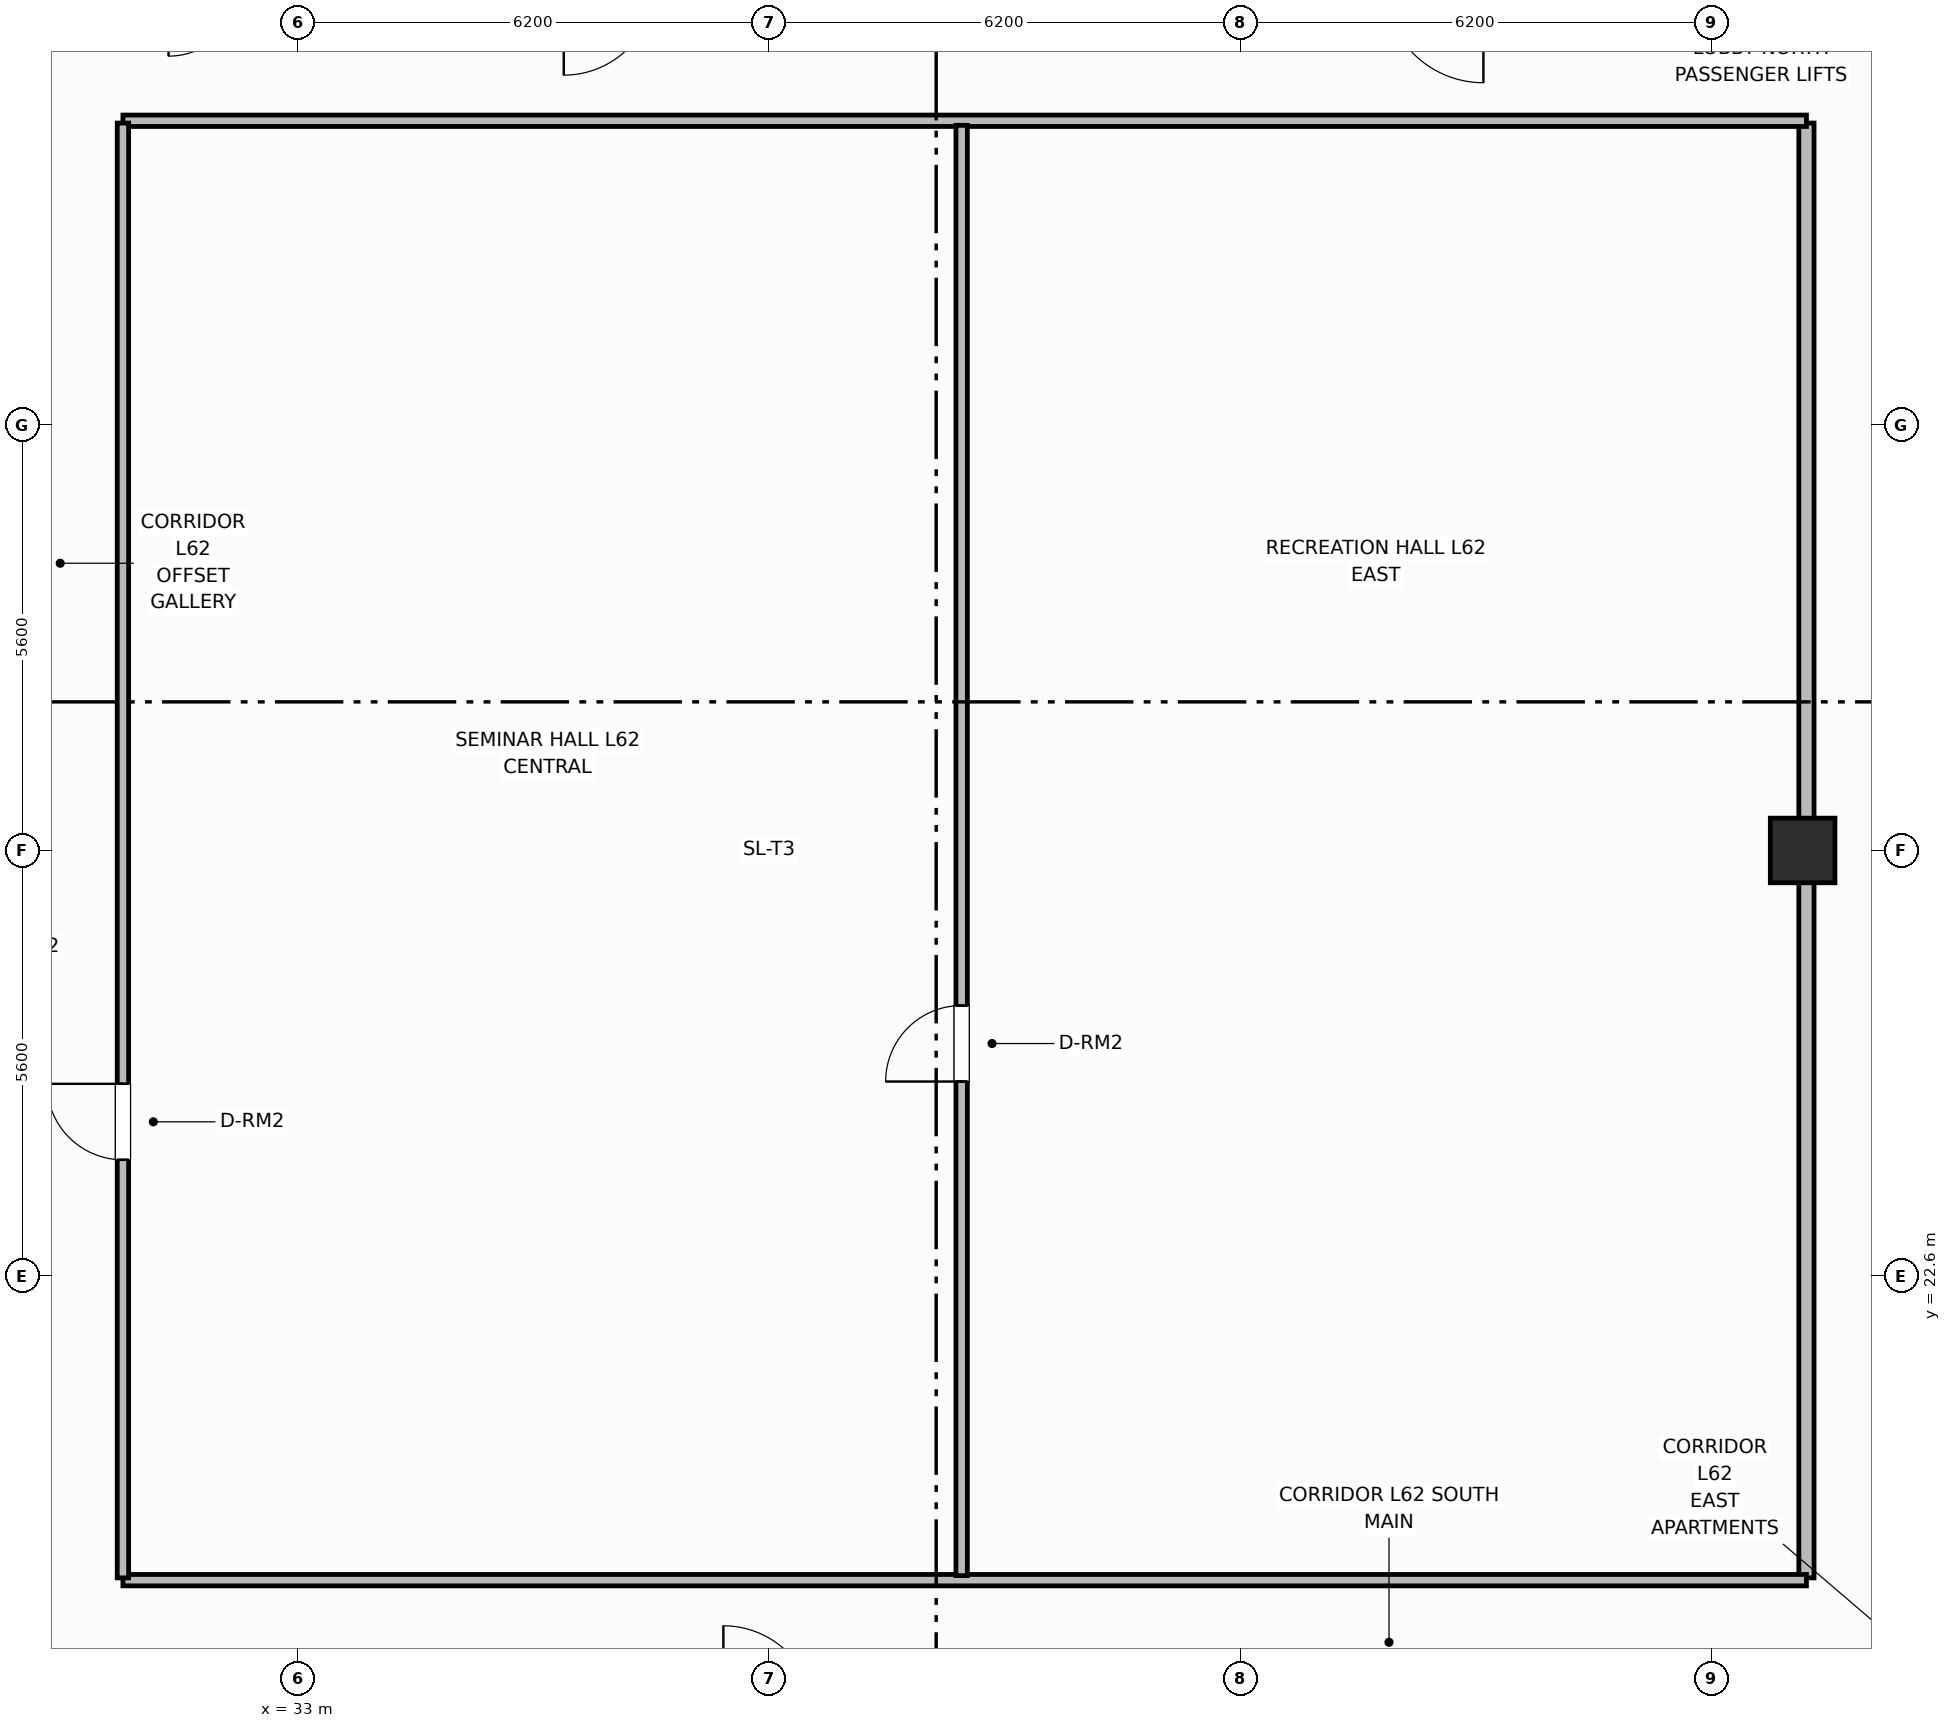
"""IFC4 building model, lengths in metres.
Left out: names, types, materials, properties, quantities, classifications, styles, units other than length and angle.
Written with IfcOpenShell. Run it as: python <this file> out.ifc"""

import sys

from ifc_helpers import new_model, si_unit, direction, frame, frame_2d, origin, origin_2d, place, context, subcontext, project, spatial, rectangle, extrude, element, fill, save


model = new_model("IFC4")
c1 = context("Model", 3, precision=1e-05, world=origin(), true_north=direction((0.0, 1.0)))
c2 = subcontext(c1, "Body", "Model", "MODEL_VIEW")
j1 = project(units=[si_unit("LENGTHUNIT", "METRE"), si_unit("PLANEANGLEUNIT", "RADIAN")], contexts=[c1])
p1 = place(None, origin())
s1 = spatial("IfcSite", under=j1, at=p1, CompositionType="ELEMENT")
p2 = place(p1, origin())
s2 = spatial("IfcBuilding", under=s1, at=p2, CompositionType="ELEMENT")
p3 = place(p2, frame((0.0, 0.0, 248.0)))
s3 = spatial("IfcBuildingStorey", under=s2, at=p3, CompositionType="ELEMENT", Elevation=248.0)
p4 = place(p3, frame((52.8, 28.2, 0.0), z_axis=(0.0, 0.0, 1.0), x_axis=(1.0, 0.0, 0.0)))
e1 = element("IfcColumn", 1, at=p4, inside=s3, PredefinedType="COLUMN", context=c2, shape_type="SweptSolid", body=[
    extrude(rectangle(XDim=0.85, YDim=0.85, at=origin_2d()), origin(), (0.0, 0.0, 1.0), 3.7),
])
p5 = place(p3, frame((52.85, 18.63, 0.0), z_axis=(0.0, 0.0, 1.0), x_axis=(0.0, 1.0, 0.0)))
e2 = element("IfcWall", 2, at=p5, inside=s3, PredefinedType="PARTITIONING", context=c2, shape_type="SweptSolid", body=[
    extrude(rectangle(XDim=19.14, YDim=0.2, at=frame_2d((9.57, 0.0))), origin(), (0.0, 0.0, 1.0), 2.56),
])
for number, where, z_axis, x_axis in (
    (3, (30.7, 18.6, 0.0), (0.0, 0.0, 1.0), (1.0, 0.0, 0.0)),
    (4, (30.7, 37.8, 0.0), (0.0, 0.0, 1.0), (1.0, 0.0, 0.0)),
):
    element("IfcWall", number, at=place(p3, frame(where, z_axis=z_axis, x_axis=x_axis)), inside=s3, PredefinedType="PARTITIONING", context=c2, shape_type="SweptSolid", body=[
        extrude(rectangle(XDim=22.15, YDim=0.15, at=frame_2d((11.075, 0.0))), origin(), (0.0, 0.0, 1.0), 2.56),
    ])
p6 = place(p3, frame((41.735, 18.66, 0.0), z_axis=(0.0, 0.0, 1.0), x_axis=(0.0, 1.0, 0.0)))
e5 = element("IfcWall", 5, at=p6, inside=s3, PredefinedType="PARTITIONING", context=c2, shape_type="SweptSolid", body=[
    extrude(rectangle(XDim=19.08, YDim=0.15, at=frame_2d((9.54, 0.0))), origin(), (0.0, 0.0, 1.0), 2.56),
])
p7 = place(p6, frame((6.5, 0.0, 0.0)))
e6 = element("IfcOpeningElement", 6, at=p7, cuts=e5, PredefinedType="OPENING", context=c2, shape_type="SweptSolid", body=[
    extrude(rectangle(XDim=1.0, YDim=2.15, at=frame_2d((0.5, 1.075))), frame((0.0, 0.085, 0.0), z_axis=(0.0, -1.0, 0.0), x_axis=(1.0, 0.0, 0.0)), (0.0, 0.0, 1.0), 0.17),
])
p8 = place(p3, frame((30.7, 18.63, 0.0), z_axis=(0.0, 0.0, 1.0), x_axis=(0.0, 1.0, 0.0)))
e7 = element("IfcWall", 7, at=p8, inside=s3, PredefinedType="PARTITIONING", context=c2, shape_type="SweptSolid", body=[
    extrude(rectangle(XDim=19.14, YDim=0.15, at=frame_2d((9.57, 0.0))), origin(), (0.0, 0.0, 1.0), 2.56),
])
p9 = place(p8, frame((5.5, 0.0, 0.0)))
e8 = element("IfcOpeningElement", 8, at=p9, cuts=e7, PredefinedType="OPENING", context=c2, shape_type="SweptSolid", body=[
    extrude(rectangle(XDim=1.0, YDim=2.15, at=frame_2d((0.5, 1.075))), frame((0.0, 0.085, 0.0), z_axis=(0.0, -1.0, 0.0), x_axis=(1.0, 0.0, 0.0)), (0.0, 0.0, 1.0), 0.17),
])
p10 = place(p7, origin())
e9 = element("IfcDoor", 9, at=p10, inside=s3, OperationType="SINGLE_SWING_LEFT", PredefinedType="DOOR", context=c2, shape_type="SweptSolid", body=[
    extrude(rectangle(XDim=1.0, YDim=2.15, at=frame_2d((0.5, 1.075))), frame((0.0, 0.025, 0.0), z_axis=(0.0, -1.0, 0.0), x_axis=(1.0, 0.0, 0.0)), (0.0, 0.0, 1.0), 0.05),
])
fill(e6, e9)
p11 = place(p9, origin())
e10 = element("IfcDoor", 10, at=p11, inside=s3, OperationType="SINGLE_SWING_RIGHT", PredefinedType="DOOR", context=c2, shape_type="SweptSolid", body=[
    extrude(rectangle(XDim=1.0, YDim=2.15, at=frame_2d((0.5, 1.075))), frame((0.0, 0.025, 0.0), z_axis=(0.0, -1.0, 0.0), x_axis=(1.0, 0.0, 0.0)), (0.0, 0.0, 1.0), 0.05),
])
fill(e8, e10)
save(model, sys.argv[1])
